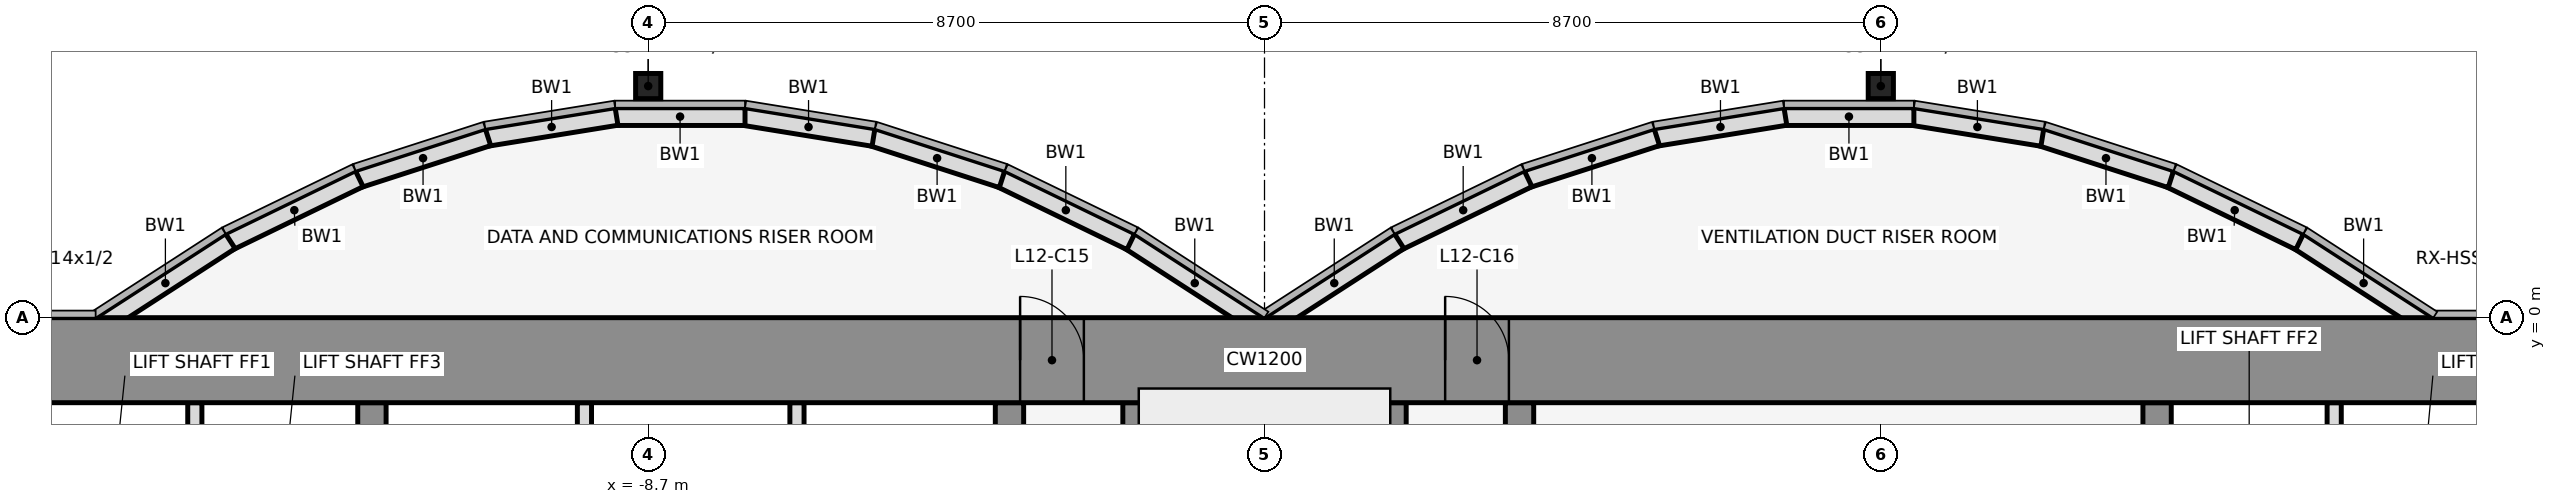
"""IFC4 building model, lengths in metres.
Left out: names, types, materials, properties, quantities, classifications, styles, units other than length and angle.
Written with IfcOpenShell. Run it as: python <this file> out.ifc"""

import sys

from ifc_helpers import new_model, si_unit, direction, frame, frame_2d, origin, origin_2d, place, context, subcontext, project, spatial, rectangle, hollow_rectangle, extrude, element, fill, save


model = new_model("IFC4")
c1 = context("Model", 3, precision=1e-05, world=origin(), true_north=direction((0.0, 1.0)))
c2 = subcontext(c1, "Body", "Model", "MODEL_VIEW")
j1 = project(units=[si_unit("LENGTHUNIT", "METRE"), si_unit("PLANEANGLEUNIT", "RADIAN")], contexts=[c1])
p1 = place(None, origin())
s1 = spatial("IfcSite", under=j1, at=p1, CompositionType="ELEMENT")
p2 = place(p1, origin())
s2 = spatial("IfcBuilding", under=s1, at=p2, CompositionType="ELEMENT")
p3 = place(p2, frame((0.0, 0.0, 62.0)))
s3 = spatial("IfcBuildingStorey", under=s2, at=p3, CompositionType="ELEMENT", Elevation=62.0)
for number, where, z_axis, x_axis in (
    (1, (-8.7, 3.269, 0.0), (0.0, 0.0, 1.0), (1.0, 0.0, 0.0)),
    (2, (8.7, 3.269, 0.0), (0.0, 0.0, 1.0), (1.0, 0.0, 0.0)),
):
    element("IfcColumn", number, at=place(p3, frame(where, z_axis=z_axis, x_axis=x_axis)), inside=s3, PredefinedType="COLUMN", context=c2, shape_type="SweptSolid", body=[
        extrude(hollow_rectangle(XDim=0.356, YDim=0.356, WallThickness=0.012, at=origin_2d()), origin(), (0.0, 0.0, 1.0), 4.5),
    ])
p4 = place(p3, frame((16.432, -0.105, 0.0), z_axis=(0.0, 0.0, 1.0), x_axis=(-0.83981312244, 0.542875602121, 0.0)))
e3 = element("IfcWall", 3, at=p4, inside=s3, PredefinedType="STANDARD", context=c2, shape_type="SweptSolid", body=[
    extrude(rectangle(XDim=2.183, YDim=0.25, at=frame_2d((1.091, 0.0))), origin(), (0.0, 0.0, 1.0), 4.35),
])
p5 = place(p3, frame((14.612, 1.073, 0.0), z_axis=(0.0, 0.0, 1.0), x_axis=(-0.89982408427, 0.436252928206, 0.0)))
e4 = element("IfcWall", 4, at=p5, inside=s3, PredefinedType="STANDARD", context=c2, shape_type="SweptSolid", body=[
    extrude(rectangle(XDim=2.038, YDim=0.25, at=frame_2d((1.019, 0.0))), origin(), (0.0, 0.0, 1.0), 4.35),
])
p6 = place(p3, frame((12.795, 1.955, 0.0), z_axis=(0.0, 0.0, 1.0), x_axis=(-0.951495806175, 0.307661714928, 0.0)))
e5 = element("IfcWall", 5, at=p6, inside=s3, PredefinedType="STANDARD", context=c2, shape_type="SweptSolid", body=[
    extrude(rectangle(XDim=1.927, YDim=0.25, at=frame_2d((0.963, 0.0))), origin(), (0.0, 0.0, 1.0), 4.35),
])
p7 = place(p3, frame((10.98, 2.543, 0.0), z_axis=(0.0, 0.0, 1.0), x_axis=(-0.987181718931, 0.159600293885, 0.0)))
e6 = element("IfcWall", 6, at=p7, inside=s3, PredefinedType="STANDARD", context=c2, shape_type="SweptSolid", body=[
    extrude(rectangle(XDim=1.857, YDim=0.25, at=frame_2d((0.929, 0.0))), origin(), (0.0, 0.0, 1.0), 4.35),
])
p8 = place(p3, frame((9.167, 2.838, 0.0), z_axis=(0.0, 0.0, 1.0), x_axis=(-1.0, 0.0, 0.0)))
e7 = element("IfcWall", 7, at=p8, inside=s3, PredefinedType="STANDARD", context=c2, shape_type="SweptSolid", body=[
    extrude(rectangle(XDim=1.833, YDim=0.25, at=frame_2d((0.917, 0.0))), origin(), (0.0, 0.0, 1.0), 4.35),
])
p9 = place(p3, frame((7.353, 2.84, 0.0), z_axis=(0.0, 0.0, 1.0), x_axis=(-0.987181718931, -0.159600293885, 0.0)))
e8 = element("IfcWall", 8, at=p9, inside=s3, PredefinedType="STANDARD", context=c2, shape_type="SweptSolid", body=[
    extrude(rectangle(XDim=1.857, YDim=0.25, at=frame_2d((0.929, 0.0))), origin(), (0.0, 0.0, 1.0), 4.35),
])
p10 = place(p3, frame((5.538, 2.548, 0.0), z_axis=(0.0, 0.0, 1.0), x_axis=(-0.951495806175, -0.307661714928, 0.0)))
e9 = element("IfcWall", 9, at=p10, inside=s3, PredefinedType="STANDARD", context=c2, shape_type="SweptSolid", body=[
    extrude(rectangle(XDim=1.927, YDim=0.25, at=frame_2d((0.963, 0.0))), origin(), (0.0, 0.0, 1.0), 4.35),
])
p11 = place(p3, frame((3.721, 1.962, 0.0), z_axis=(0.0, 0.0, 1.0), x_axis=(-0.89982408427, -0.436252928206, 0.0)))
e10 = element("IfcWall", 10, at=p11, inside=s3, PredefinedType="STANDARD", context=c2, shape_type="SweptSolid", body=[
    extrude(rectangle(XDim=2.038, YDim=0.25, at=frame_2d((1.019, 0.0))), origin(), (0.0, 0.0, 1.0), 4.35),
])
for number, where, z_axis, x_axis in (
    (11, (1.901, 1.08, 0.0), (0.0, 0.0, 1.0), (-0.84, -0.543, 0.0)),
    (12, (-0.068, -0.105, 0.0), (0.0, 0.0, 1.0), (-0.84, 0.543, 0.0)),
):
    element("IfcWall", number, at=place(p3, frame(where, z_axis=z_axis, x_axis=x_axis)), inside=s3, PredefinedType="STANDARD", context=c2, shape_type="SweptSolid", body=[
        extrude(rectangle(XDim=2.183, YDim=0.25, at=frame_2d((1.091, 0.0))), origin(), (0.0, 0.0, 1.0), 4.35),
    ])
p12 = place(p3, frame((-1.888, 1.073, 0.0), z_axis=(0.0, 0.0, 1.0), x_axis=(-0.89982408427, 0.436252928206, 0.0)))
e13 = element("IfcWall", 13, at=p12, inside=s3, PredefinedType="STANDARD", context=c2, shape_type="SweptSolid", body=[
    extrude(rectangle(XDim=2.038, YDim=0.25, at=frame_2d((1.019, 0.0))), origin(), (0.0, 0.0, 1.0), 4.35),
])
p13 = place(p3, frame((-3.705, 1.955, 0.0), z_axis=(0.0, 0.0, 1.0), x_axis=(-0.951495806175, 0.307661714928, 0.0)))
e14 = element("IfcWall", 14, at=p13, inside=s3, PredefinedType="STANDARD", context=c2, shape_type="SweptSolid", body=[
    extrude(rectangle(XDim=1.927, YDim=0.25, at=frame_2d((0.963, 0.0))), origin(), (0.0, 0.0, 1.0), 4.35),
])
p14 = place(p3, frame((-5.52, 2.543, 0.0), z_axis=(0.0, 0.0, 1.0), x_axis=(-0.987181718931, 0.159600293885, 0.0)))
e15 = element("IfcWall", 15, at=p14, inside=s3, PredefinedType="STANDARD", context=c2, shape_type="SweptSolid", body=[
    extrude(rectangle(XDim=1.857, YDim=0.25, at=frame_2d((0.929, 0.0))), origin(), (0.0, 0.0, 1.0), 4.35),
])
p15 = place(p3, frame((-7.333, 2.838, 0.0), z_axis=(0.0, 0.0, 1.0), x_axis=(-1.0, 0.0, 0.0)))
e16 = element("IfcWall", 16, at=p15, inside=s3, PredefinedType="STANDARD", context=c2, shape_type="SweptSolid", body=[
    extrude(rectangle(XDim=1.833, YDim=0.25, at=frame_2d((0.917, 0.0))), origin(), (0.0, 0.0, 1.0), 4.35),
])
p16 = place(p3, frame((-9.147, 2.84, 0.0), z_axis=(0.0, 0.0, 1.0), x_axis=(-0.987181718931, -0.159600293885, 0.0)))
e17 = element("IfcWall", 17, at=p16, inside=s3, PredefinedType="STANDARD", context=c2, shape_type="SweptSolid", body=[
    extrude(rectangle(XDim=1.857, YDim=0.25, at=frame_2d((0.929, 0.0))), origin(), (0.0, 0.0, 1.0), 4.35),
])
p17 = place(p3, frame((-10.962, 2.548, 0.0), z_axis=(0.0, 0.0, 1.0), x_axis=(-0.951495806175, -0.307661714928, 0.0)))
e18 = element("IfcWall", 18, at=p17, inside=s3, PredefinedType="STANDARD", context=c2, shape_type="SweptSolid", body=[
    extrude(rectangle(XDim=1.927, YDim=0.25, at=frame_2d((0.963, 0.0))), origin(), (0.0, 0.0, 1.0), 4.35),
])
p18 = place(p3, frame((-12.779, 1.962, 0.0), z_axis=(0.0, 0.0, 1.0), x_axis=(-0.89982408427, -0.436252928206, 0.0)))
e19 = element("IfcWall", 19, at=p18, inside=s3, PredefinedType="STANDARD", context=c2, shape_type="SweptSolid", body=[
    extrude(rectangle(XDim=2.038, YDim=0.25, at=frame_2d((1.019, 0.0))), origin(), (0.0, 0.0, 1.0), 4.35),
])
p19 = place(p3, frame((-14.599, 1.08, 0.0), z_axis=(0.0, 0.0, 1.0), x_axis=(-0.83981312244, -0.542875602121, 0.0)))
e20 = element("IfcWall", 20, at=p19, inside=s3, PredefinedType="STANDARD", context=c2, shape_type="SweptSolid", body=[
    extrude(rectangle(XDim=2.183, YDim=0.25, at=frame_2d((1.091, 0.0))), origin(), (0.0, 0.0, 1.0), 4.35),
])
p20 = place(p3, frame((-15.1, -4.6, 0.0), z_axis=(0.0, 0.0, 1.0), x_axis=(0.0, 1.0, 0.0)))
e21 = element("IfcWall", 21, at=p20, inside=s3, PredefinedType="PARTITIONING", context=c2, shape_type="SweptSolid", body=[
    extrude(rectangle(XDim=3.4, YDim=0.2, at=frame_2d((1.7, 0.0))), origin(), (0.0, 0.0, 1.0), 3.418),
])
p21 = place(p3, frame((-12.6, -11.8, 0.0), z_axis=(0.0, 0.0, 1.0), x_axis=(0.0, 1.0, 0.0)))
e22 = element("IfcWall", 22, at=p21, inside=s3, PredefinedType="SHEAR", context=c2, shape_type="SweptSolid", body=[
    extrude(rectangle(XDim=10.6, YDim=0.4, at=frame_2d((5.3, 0.0))), origin(), (0.0, 0.0, 1.0), 4.5),
])
p22 = place(p21, frame((4.75, 0.0, 0.0)))
e23 = element("IfcOpeningElement", 23, at=p22, cuts=e22, PredefinedType="OPENING", context=c2, shape_type="SweptSolid", body=[
    extrude(rectangle(XDim=1.1, YDim=2.1, at=frame_2d((0.55, 1.05))), frame((0.0, 0.212, 0.0), z_axis=(0.0, -1.0, 0.0), x_axis=(1.0, 0.0, 0.0)), (0.0, 0.0, 1.0), 0.424),
])
for number, where, z_axis, x_axis in (
    (24, (-9.6, -4.6, 0.0), (0.0, 0.0, 1.0), (0.0, 1.0, 0.0)),
    (25, (-6.6, -4.6, 0.0), (0.0, 0.0, 1.0), (0.0, 1.0, 0.0)),
):
    element("IfcWall", number, at=place(p3, frame(where, z_axis=z_axis, x_axis=x_axis)), inside=s3, PredefinedType="PARTITIONING", context=c2, shape_type="SweptSolid", body=[
        extrude(rectangle(XDim=3.4, YDim=0.2, at=frame_2d((1.7, 0.0))), origin(), (0.0, 0.0, 1.0), 3.418),
    ])
p23 = place(p3, frame((-3.6, -11.8, 0.0), z_axis=(0.0, 0.0, 1.0), x_axis=(0.0, 1.0, 0.0)))
e26 = element("IfcWall", 26, at=p23, inside=s3, PredefinedType="SHEAR", context=c2, shape_type="SweptSolid", body=[
    extrude(rectangle(XDim=10.6, YDim=0.4, at=frame_2d((5.3, 0.0))), origin(), (0.0, 0.0, 1.0), 4.5),
])
p24 = place(p23, frame((4.85, 0.0, 0.0)))
e27 = element("IfcOpeningElement", 27, at=p24, cuts=e26, PredefinedType="OPENING", context=c2, shape_type="SweptSolid", body=[
    extrude(rectangle(XDim=0.9, YDim=2.1, at=frame_2d((0.45, 1.05))), frame((0.0, 0.212, 0.0), z_axis=(0.0, -1.0, 0.0), x_axis=(1.0, 0.0, 0.0)), (0.0, 0.0, 1.0), 0.424),
])
for number, where, z_axis, x_axis in (
    (28, (-1.8, -11.8, 0.0), (0.0, 0.0, 1.0), (0.0, 1.0, 0.0)),
    (29, (1.8, -11.8, 0.0), (0.0, 0.0, 1.0), (0.0, 1.0, 0.0)),
):
    element("IfcWall", number, at=place(p3, frame(where, z_axis=z_axis, x_axis=x_axis)), inside=s3, PredefinedType="SHEAR", context=c2, shape_type="SweptSolid", body=[
        extrude(rectangle(XDim=10.6, YDim=0.4, at=frame_2d((5.3, 0.0))), origin(), (0.0, 0.0, 1.0), 4.5),
    ])
p25 = place(p3, frame((3.6, -11.8, 0.0), z_axis=(0.0, 0.0, 1.0), x_axis=(0.0, 1.0, 0.0)))
e30 = element("IfcWall", 30, at=p25, inside=s3, PredefinedType="SHEAR", context=c2, shape_type="SweptSolid", body=[
    extrude(rectangle(XDim=10.6, YDim=0.4, at=frame_2d((5.3, 0.0))), origin(), (0.0, 0.0, 1.0), 4.5),
])
p26 = place(p25, frame((1.35, 0.0, 0.0)))
e31 = element("IfcOpeningElement", 31, at=p26, cuts=e30, PredefinedType="OPENING", context=c2, shape_type="SweptSolid", body=[
    extrude(rectangle(XDim=0.9, YDim=2.1, at=frame_2d((0.45, 1.05))), frame((0.0, 0.212, 0.0), z_axis=(0.0, -1.0, 0.0), x_axis=(1.0, 0.0, 0.0)), (0.0, 0.0, 1.0), 0.424),
])
p27 = place(p3, frame((12.6, -11.8, 0.0), z_axis=(0.0, 0.0, 1.0), x_axis=(0.0, 1.0, 0.0)))
e32 = element("IfcWall", 32, at=p27, inside=s3, PredefinedType="SHEAR", context=c2, shape_type="SweptSolid", body=[
    extrude(rectangle(XDim=10.6, YDim=0.4, at=frame_2d((5.3, 0.0))), origin(), (0.0, 0.0, 1.0), 4.5),
])
p28 = place(p27, frame((4.75, 0.0, 0.0)))
e33 = element("IfcOpeningElement", 33, at=p28, cuts=e32, PredefinedType="OPENING", context=c2, shape_type="SweptSolid", body=[
    extrude(rectangle(XDim=1.1, YDim=2.1, at=frame_2d((0.55, 1.05))), frame((0.0, 0.212, 0.0), z_axis=(0.0, -1.0, 0.0), x_axis=(1.0, 0.0, 0.0)), (0.0, 0.0, 1.0), 0.424),
])
p29 = place(p3, frame((15.1, -4.6, 0.0), z_axis=(0.0, 0.0, 1.0), x_axis=(0.0, 1.0, 0.0)))
e34 = element("IfcWall", 34, at=p29, inside=s3, PredefinedType="PARTITIONING", context=c2, shape_type="SweptSolid", body=[
    extrude(rectangle(XDim=3.4, YDim=0.2, at=frame_2d((1.7, 0.0))), origin(), (0.0, 0.0, 1.0), 3.418),
])
p30 = place(p3, frame((-22.0, -0.6, 0.0), z_axis=(0.0, 0.0, 1.0), x_axis=(1.0, 0.0, 0.0)))
e35 = element("IfcWall", 35, at=p30, inside=s3, PredefinedType="SHEAR", context=c2, shape_type="SweptSolid", body=[
    extrude(rectangle(XDim=44.0, YDim=1.2, at=frame_2d((22.0, 0.0))), origin(), (0.0, 0.0, 1.0), 4.5),
])
p31 = place(p30, frame((18.55, 0.0, 0.0)))
e36 = element("IfcOpeningElement", 36, at=p31, cuts=e35, PredefinedType="OPENING", context=c2, shape_type="SweptSolid", body=[
    extrude(rectangle(XDim=0.9, YDim=2.1, at=frame_2d((0.45, 1.05))), frame((0.0, 0.612, 0.0), z_axis=(0.0, -1.0, 0.0), x_axis=(1.0, 0.0, 0.0)), (0.0, 0.0, 1.0), 1.224),
])
p32 = place(p30, frame((24.55, 0.0, 0.0)))
e37 = element("IfcOpeningElement", 37, at=p32, cuts=e35, PredefinedType="OPENING", context=c2, shape_type="SweptSolid", body=[
    extrude(rectangle(XDim=0.9, YDim=2.1, at=frame_2d((0.45, 1.05))), frame((0.0, 0.612, 0.0), z_axis=(0.0, -1.0, 0.0), x_axis=(1.0, 0.0, 0.0)), (0.0, 0.0, 1.0), 1.224),
])
p33 = place(p31, origin())
e38 = element("IfcDoor", 38, at=p33, inside=s3, OperationType="SINGLE_SWING_LEFT", PredefinedType="DOOR", context=c2, shape_type="SweptSolid", body=[
    extrude(rectangle(XDim=0.9, YDim=2.1, at=frame_2d((0.45, 1.05))), frame((0.0, 0.025, 0.0), z_axis=(0.0, -1.0, 0.0), x_axis=(1.0, 0.0, 0.0)), (0.0, 0.0, 1.0), 0.05),
])
fill(e36, e38)
p34 = place(p32, origin())
e39 = element("IfcDoor", 39, at=p34, inside=s3, OperationType="SINGLE_SWING_LEFT", PredefinedType="DOOR", context=c2, shape_type="SweptSolid", body=[
    extrude(rectangle(XDim=0.9, YDim=2.1, at=frame_2d((0.45, 1.05))), frame((0.0, 0.025, 0.0), z_axis=(0.0, -1.0, 0.0), x_axis=(1.0, 0.0, 0.0)), (0.0, 0.0, 1.0), 0.05),
])
fill(e37, e39)
save(model, sys.argv[1])
